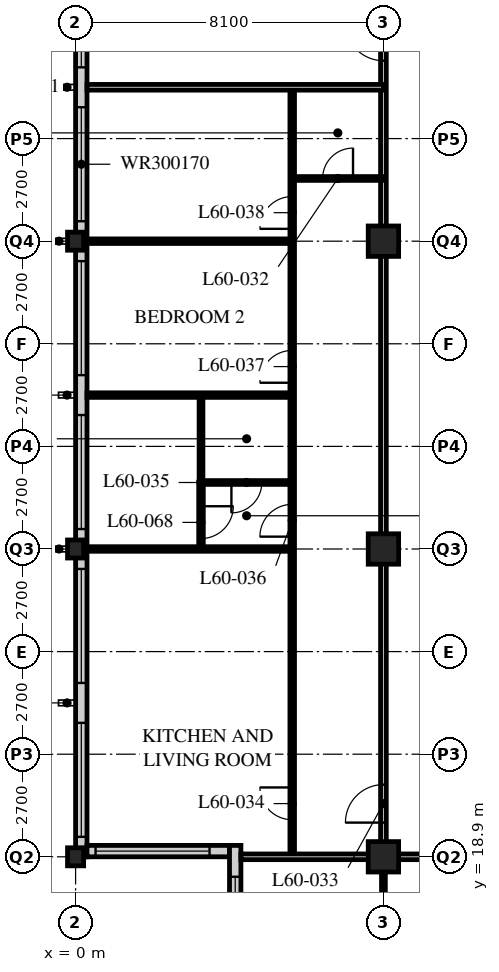
"""IFC4 building model, lengths in metres.
Left out: names, types, materials, properties, quantities, classifications, styles, units other than length and angle.
Written with IfcOpenShell. Run it as: python <this file> out.ifc"""

import sys

from ifc_helpers import new_model, si_unit, direction, frame, frame_2d, origin, origin_2d, place, context, subcontext, project, spatial, rectangle, hollow_rectangle, i_section, extrude, element, fill, save


model = new_model("IFC4")
c1 = context("Model", 3, precision=1e-05, world=origin(), true_north=direction((0.0, 1.0)))
c2 = subcontext(c1, "Body", "Model", "MODEL_VIEW")
j1 = project(units=[si_unit("LENGTHUNIT", "METRE"), si_unit("PLANEANGLEUNIT", "RADIAN")], contexts=[c1])
p1 = place(None, origin())
s1 = spatial("IfcSite", under=j1, at=p1, CompositionType="ELEMENT")
p2 = place(p1, origin())
s2 = spatial("IfcBuilding", under=s1, at=p2, CompositionType="ELEMENT")
p3 = place(p2, frame((0.0, 0.0, 231.6)))
s3 = spatial("IfcBuildingStorey", under=s2, at=p3, CompositionType="ELEMENT", Elevation=231.6)
for number, where, z_axis, x_axis in (
    (1, (0.0, 18.9, 0.0), (0.0, 0.0, 1.0), (1.0, 0.0, 0.0)),
    (2, (0.0, 27.0, 0.0), (0.0, 0.0, 1.0), (1.0, 0.0, 0.0)),
    (3, (0.0, 35.1, 0.0), (0.0, 0.0, 1.0), (1.0, 0.0, 0.0)),
):
    element("IfcColumn", number, at=place(p3, frame(where, z_axis=z_axis, x_axis=x_axis)), inside=s3, PredefinedType="COLUMN", context=c2, shape_type="SweptSolid", body=[
        extrude(i_section(OverallWidth=0.424, OverallDepth=0.475, WebThickness=0.048, FlangeThickness=0.077, FilletRadius=0.015, at=origin_2d()), origin(), (0.0, 0.0, 1.0), 3.6),
    ])
for number, where, z_axis, x_axis in (
    (4, (8.1, 18.9, 0.0), (0.0, 0.0, 1.0), (1.0, 0.0, 0.0)),
    (5, (8.1, 27.0, 0.0), (0.0, 0.0, 1.0), (1.0, 0.0, 0.0)),
    (6, (8.1, 35.1, 0.0), (0.0, 0.0, 1.0), (1.0, 0.0, 0.0)),
):
    element("IfcColumn", number, at=place(p3, frame(where, z_axis=z_axis, x_axis=x_axis)), inside=s3, PredefinedType="COLUMN", context=c2, shape_type="SweptSolid", body=[
        extrude(hollow_rectangle(XDim=0.8, YDim=0.8, WallThickness=0.08, at=origin_2d()), origin(), (0.0, 0.0, 1.0), 3.6),
    ])
p4 = place(p3, frame((0.15, 51.0, 0.0), z_axis=(0.0, 0.0, 1.0), x_axis=(0.0, -1.0, 0.0)))
e7 = element("IfcWall", 7, at=p4, inside=s3, PredefinedType="SOLIDWALL", context=c2, shape_type="SweptSolid", body=[
    extrude(rectangle(XDim=32.1, YDim=0.3, at=frame_2d((16.05, 0.0))), origin(), (0.0, 0.0, 1.0), 2.35),
])
p5 = place(p4, frame((0.225, 0.0, 0.6)))
e8 = element("IfcOpeningElement", 8, at=p5, cuts=e7, PredefinedType="OPENING", context=c2, shape_type="SweptSolid", body=[
    extrude(rectangle(XDim=3.0, YDim=1.7, at=frame_2d((1.5, 0.85))), frame((0.0, 0.16, 0.0), z_axis=(0.0, -1.0, 0.0), x_axis=(1.0, 0.0, 0.0)), (0.0, 0.0, 1.0), 0.32),
])
p6 = place(p4, frame((4.275, 0.0, 0.6)))
e9 = element("IfcOpeningElement", 9, at=p6, cuts=e7, PredefinedType="OPENING", context=c2, shape_type="SweptSolid", body=[
    extrude(rectangle(XDim=3.0, YDim=1.7, at=frame_2d((1.5, 0.85))), frame((0.0, 0.16, 0.0), z_axis=(0.0, -1.0, 0.0), x_axis=(1.0, 0.0, 0.0)), (0.0, 0.0, 1.0), 0.32),
])
p7 = place(p4, frame((8.325, 0.0, 0.6)))
e10 = element("IfcOpeningElement", 10, at=p7, cuts=e7, PredefinedType="OPENING", context=c2, shape_type="SweptSolid", body=[
    extrude(rectangle(XDim=3.0, YDim=1.7, at=frame_2d((1.5, 0.85))), frame((0.0, 0.16, 0.0), z_axis=(0.0, -1.0, 0.0), x_axis=(1.0, 0.0, 0.0)), (0.0, 0.0, 1.0), 0.32),
])
p8 = place(p4, frame((12.375, 0.0, 0.6)))
e11 = element("IfcOpeningElement", 11, at=p8, cuts=e7, PredefinedType="OPENING", context=c2, shape_type="SweptSolid", body=[
    extrude(rectangle(XDim=3.0, YDim=1.7, at=frame_2d((1.5, 0.85))), frame((0.0, 0.16, 0.0), z_axis=(0.0, -1.0, 0.0), x_axis=(1.0, 0.0, 0.0)), (0.0, 0.0, 1.0), 0.32),
])
p9 = place(p4, frame((16.425, 0.0, 0.6)))
e12 = element("IfcOpeningElement", 12, at=p9, cuts=e7, PredefinedType="OPENING", context=c2, shape_type="SweptSolid", body=[
    extrude(rectangle(XDim=3.0, YDim=1.7, at=frame_2d((1.5, 0.85))), frame((0.0, 0.16, 0.0), z_axis=(0.0, -1.0, 0.0), x_axis=(1.0, 0.0, 0.0)), (0.0, 0.0, 1.0), 0.32),
])
p10 = place(p4, frame((20.475, 0.0, 0.6)))
e13 = element("IfcOpeningElement", 13, at=p10, cuts=e7, PredefinedType="OPENING", context=c2, shape_type="SweptSolid", body=[
    extrude(rectangle(XDim=3.0, YDim=1.7, at=frame_2d((1.5, 0.85))), frame((0.0, 0.16, 0.0), z_axis=(0.0, -1.0, 0.0), x_axis=(1.0, 0.0, 0.0)), (0.0, 0.0, 1.0), 0.32),
])
p11 = place(p4, frame((24.525, 0.0, 0.6)))
e14 = element("IfcOpeningElement", 14, at=p11, cuts=e7, PredefinedType="OPENING", context=c2, shape_type="SweptSolid", body=[
    extrude(rectangle(XDim=3.0, YDim=1.7, at=frame_2d((1.5, 0.85))), frame((0.0, 0.16, 0.0), z_axis=(0.0, -1.0, 0.0), x_axis=(1.0, 0.0, 0.0)), (0.0, 0.0, 1.0), 0.32),
])
p12 = place(p4, frame((28.575, 0.0, 0.6)))
e15 = element("IfcOpeningElement", 15, at=p12, cuts=e7, PredefinedType="OPENING", context=c2, shape_type="SweptSolid", body=[
    extrude(rectangle(XDim=3.0, YDim=1.7, at=frame_2d((1.5, 0.85))), frame((0.0, 0.16, 0.0), z_axis=(0.0, -1.0, 0.0), x_axis=(1.0, 0.0, 0.0)), (0.0, 0.0, 1.0), 0.32),
])
p13 = place(p3, frame((0.3, 19.05, 0.0), z_axis=(0.0, 0.0, 1.0), x_axis=(1.0, 0.0, 0.0)))
e16 = element("IfcWall", 16, at=p13, inside=s3, PredefinedType="SOLIDWALL", context=c2, shape_type="SweptSolid", body=[
    extrude(rectangle(XDim=3.75, YDim=0.3, at=frame_2d((1.875, 0.0))), origin(), (0.0, 0.0, 1.0), 2.35),
])
p14 = place(p13, frame((0.225, 0.0, 0.6)))
e17 = element("IfcOpeningElement", 17, at=p14, cuts=e16, PredefinedType="OPENING", context=c2, shape_type="SweptSolid", body=[
    extrude(rectangle(XDim=3.0, YDim=1.7, at=frame_2d((1.5, 0.85))), frame((0.0, 0.16, 0.0), z_axis=(0.0, -1.0, 0.0), x_axis=(1.0, 0.0, 0.0)), (0.0, 0.0, 1.0), 0.32),
])
p15 = place(p3, frame((4.2, 19.2, 0.0), z_axis=(0.0, 0.0, 1.0), x_axis=(0.0, -1.0, 0.0)))
e18 = element("IfcWall", 18, at=p15, inside=s3, PredefinedType="SOLIDWALL", context=c2, shape_type="SweptSolid", body=[
    extrude(rectangle(XDim=4.35, YDim=0.3, at=frame_2d((2.175, 0.0))), origin(), (0.0, 0.0, 1.0), 2.65),
])
p16 = place(p15, frame((0.825, 0.0, 0.6)))
e19 = element("IfcOpeningElement", 19, at=p16, cuts=e18, PredefinedType="OPENING", context=c2, shape_type="SweptSolid", body=[
    extrude(rectangle(XDim=3.0, YDim=1.7, at=frame_2d((1.5, 0.85))), frame((0.0, 0.16, 0.0), z_axis=(0.0, -1.0, 0.0), x_axis=(1.0, 0.0, 0.0)), (0.0, 0.0, 1.0), 0.32),
])
p17 = place(p3, frame((8.1, 18.9, 0.0), z_axis=(0.0, 0.0, 1.0), x_axis=(1.0, 0.0, 0.0)))
e20 = element("IfcWall", 20, at=p17, inside=s3, PredefinedType="PARTITIONING", context=c2, shape_type="SweptSolid", body=[
    extrude(rectangle(XDim=36.45, YDim=0.15, at=frame_2d((18.225, 0.0))), origin(), (0.0, 0.0, 1.0), 2.35),
])
p18 = place(p17, frame((4.45, 0.0, 0.0)))
e21 = element("IfcOpeningElement", 21, at=p18, cuts=e20, PredefinedType="OPENING", context=c2, shape_type="SweptSolid", body=[
    extrude(rectangle(XDim=1.0, YDim=2.1, at=frame_2d((0.5, 1.05))), frame((0.0, 0.085, 0.0), z_axis=(0.0, -1.0, 0.0), x_axis=(1.0, 0.0, 0.0)), (0.0, 0.0, 1.0), 0.17),
])
p19 = place(p17, frame((17.1, 0.0, 0.0)))
e22 = element("IfcOpeningElement", 22, at=p19, cuts=e20, PredefinedType="OPENING", context=c2, shape_type="SweptSolid", body=[
    extrude(rectangle(XDim=1.0, YDim=2.1, at=frame_2d((0.5, 1.05))), frame((0.0, 0.085, 0.0), z_axis=(0.0, -1.0, 0.0), x_axis=(1.0, 0.0, 0.0)), (0.0, 0.0, 1.0), 0.17),
])
p20 = place(p17, frame((29.05, 0.0, 0.0)))
e23 = element("IfcOpeningElement", 23, at=p20, cuts=e20, PredefinedType="OPENING", context=c2, shape_type="SweptSolid", body=[
    extrude(rectangle(XDim=1.0, YDim=2.1, at=frame_2d((0.5, 1.05))), frame((0.0, 0.085, 0.0), z_axis=(0.0, -1.0, 0.0), x_axis=(1.0, 0.0, 0.0)), (0.0, 0.0, 1.0), 0.17),
])
p21 = place(p17, frame((2.625, 0.0, 0.0)))
e24 = element("IfcOpeningElement", 24, at=p21, cuts=e20, PredefinedType="OPENING", context=c2, shape_type="SweptSolid", body=[
    extrude(rectangle(XDim=1.0, YDim=2.1, at=frame_2d((0.5, 1.05))), frame((0.0, 0.085, 0.0), z_axis=(0.0, -1.0, 0.0), x_axis=(1.0, 0.0, 0.0)), (0.0, 0.0, 1.0), 0.17),
])
p22 = place(p17, frame((33.925, 0.0, 0.0)))
e25 = element("IfcOpeningElement", 25, at=p22, cuts=e20, PredefinedType="OPENING", context=c2, shape_type="SweptSolid", body=[
    extrude(rectangle(XDim=1.0, YDim=2.1, at=frame_2d((0.5, 1.05))), frame((0.0, 0.085, 0.0), z_axis=(0.0, -1.0, 0.0), x_axis=(1.0, 0.0, 0.0)), (0.0, 0.0, 1.0), 0.17),
])
p23 = place(p3, frame((8.1, 18.9, 0.0), z_axis=(0.0, 0.0, 1.0), x_axis=(0.0, 1.0, 0.0)))
e26 = element("IfcWall", 26, at=p23, inside=s3, PredefinedType="PARTITIONING", context=c2, shape_type="SweptSolid", body=[
    extrude(rectangle(XDim=24.3, YDim=0.15, at=frame_2d((12.15, 0.0))), origin(), (0.0, 0.0, 1.0), 2.35),
])
p24 = place(p23, frame((0.9, 0.0, 0.0)))
e27 = element("IfcOpeningElement", 27, at=p24, cuts=e26, PredefinedType="OPENING", context=c2, shape_type="SweptSolid", body=[
    extrude(rectangle(XDim=1.0, YDim=2.1, at=frame_2d((0.5, 1.05))), frame((0.0, 0.085, 0.0), z_axis=(0.0, -1.0, 0.0), x_axis=(1.0, 0.0, 0.0)), (0.0, 0.0, 1.0), 0.17),
])
p25 = place(p23, frame((20.95, 0.0, 0.0)))
e28 = element("IfcOpeningElement", 28, at=p25, cuts=e26, PredefinedType="OPENING", context=c2, shape_type="SweptSolid", body=[
    extrude(rectangle(XDim=1.0, YDim=2.1, at=frame_2d((0.5, 1.05))), frame((0.0, 0.085, 0.0), z_axis=(0.0, -1.0, 0.0), x_axis=(1.0, 0.0, 0.0)), (0.0, 0.0, 1.0), 0.17),
])
p26 = place(p3, frame((5.7, 18.9, 0.0), z_axis=(0.0, 0.0, 1.0), x_axis=(0.0, 1.0, 0.0)))
e29 = element("IfcWall", 29, at=p26, inside=s3, PredefinedType="PARTITIONING", context=c2, shape_type="SweptSolid", body=[
    extrude(rectangle(XDim=20.25, YDim=0.12, at=frame_2d((10.125, 0.0))), origin(), (0.0, 0.0, 1.0), 3.35),
])
p27 = place(p26, frame((0.975, 0.0, 0.0)))
e30 = element("IfcOpeningElement", 30, at=p27, cuts=e29, PredefinedType="OPENING", context=c2, shape_type="SweptSolid", body=[
    extrude(rectangle(XDim=0.85, YDim=2.1, at=frame_2d((0.425, 1.05))), frame((0.0, 0.07, 0.0), z_axis=(0.0, -1.0, 0.0), x_axis=(1.0, 0.0, 0.0)), (0.0, 0.0, 1.0), 0.14),
])
p28 = place(p26, frame((8.425, 0.0, 0.0)))
e31 = element("IfcOpeningElement", 31, at=p28, cuts=e29, PredefinedType="OPENING", context=c2, shape_type="SweptSolid", body=[
    extrude(rectangle(XDim=0.85, YDim=2.1, at=frame_2d((0.425, 1.05))), frame((0.0, 0.07, 0.0), z_axis=(0.0, -1.0, 0.0), x_axis=(1.0, 0.0, 0.0)), (0.0, 0.0, 1.0), 0.14),
])
p29 = place(p26, frame((12.475, 0.0, 0.0)))
e32 = element("IfcOpeningElement", 32, at=p29, cuts=e29, PredefinedType="OPENING", context=c2, shape_type="SweptSolid", body=[
    extrude(rectangle(XDim=0.85, YDim=2.1, at=frame_2d((0.425, 1.05))), frame((0.0, 0.07, 0.0), z_axis=(0.0, -1.0, 0.0), x_axis=(1.0, 0.0, 0.0)), (0.0, 0.0, 1.0), 0.14),
])
p30 = place(p26, frame((16.525, 0.0, 0.0)))
e33 = element("IfcOpeningElement", 33, at=p30, cuts=e29, PredefinedType="OPENING", context=c2, shape_type="SweptSolid", body=[
    extrude(rectangle(XDim=0.85, YDim=2.1, at=frame_2d((0.425, 1.05))), frame((0.0, 0.07, 0.0), z_axis=(0.0, -1.0, 0.0), x_axis=(1.0, 0.0, 0.0)), (0.0, 0.0, 1.0), 0.14),
])
p31 = place(p3, frame((8.1, 36.75, 0.0), z_axis=(0.0, 0.0, 1.0), x_axis=(-1.0, 0.0, 0.0)))
e34 = element("IfcWall", 34, at=p31, inside=s3, PredefinedType="PARTITIONING", context=c2, shape_type="SweptSolid", body=[
    extrude(rectangle(XDim=2.4, YDim=0.1, at=frame_2d((1.2, 0.0))), origin(), (0.0, 0.0, 1.0), 3.35),
])
p32 = place(p31, frame((0.8, 0.0, 0.0)))
e35 = element("IfcOpeningElement", 35, at=p32, cuts=e34, PredefinedType="OPENING", context=c2, shape_type="SweptSolid", body=[
    extrude(rectangle(XDim=0.8, YDim=2.1, at=frame_2d((0.4, 1.05))), frame((0.0, 0.06, 0.0), z_axis=(0.0, -1.0, 0.0), x_axis=(1.0, 0.0, 0.0)), (0.0, 0.0, 1.0), 0.12),
])
p33 = place(p3, frame((5.7, 28.75, 0.0), z_axis=(0.0, 0.0, 1.0), x_axis=(-1.0, 0.0, 0.0)))
e36 = element("IfcWall", 36, at=p33, inside=s3, PredefinedType="PARTITIONING", context=c2, shape_type="SweptSolid", body=[
    extrude(rectangle(XDim=2.4, YDim=0.1, at=frame_2d((1.2, 0.0))), origin(), (0.0, 0.0, 1.0), 3.35),
])
p34 = place(p33, frame((0.8, 0.0, 0.0)))
e37 = element("IfcOpeningElement", 37, at=p34, cuts=e36, PredefinedType="OPENING", context=c2, shape_type="SweptSolid", body=[
    extrude(rectangle(XDim=0.8, YDim=2.1, at=frame_2d((0.4, 1.05))), frame((0.0, 0.06, 0.0), z_axis=(0.0, -1.0, 0.0), x_axis=(1.0, 0.0, 0.0)), (0.0, 0.0, 1.0), 0.12),
])
p35 = place(p3, frame((3.3, 28.75, 0.0), z_axis=(0.0, 0.0, 1.0), x_axis=(0.0, 1.0, 0.0)))
e38 = element("IfcWall", 38, at=p35, inside=s3, PredefinedType="PARTITIONING", context=c2, shape_type="SweptSolid", body=[
    extrude(rectangle(XDim=2.3, YDim=0.1, at=frame_2d((1.15, 0.0))), origin(), (0.0, 0.0, 1.0), 3.35),
])
p36 = place(p3, frame((5.7, 27.0, 0.0), z_axis=(0.0, 0.0, 1.0), x_axis=(-1.0, 0.0, 0.0)))
e39 = element("IfcWall", 39, at=p36, inside=s3, PredefinedType="PARTITIONING", context=c2, shape_type="SweptSolid", body=[
    extrude(rectangle(XDim=5.4, YDim=0.12, at=frame_2d((2.7, 0.0))), origin(), (0.0, 0.0, 1.0), 2.588),
])
p37 = place(p3, frame((5.7, 31.05, 0.0), z_axis=(0.0, 0.0, 1.0), x_axis=(-1.0, 0.0, 0.0)))
e40 = element("IfcWall", 40, at=p37, inside=s3, PredefinedType="PARTITIONING", context=c2, shape_type="SweptSolid", body=[
    extrude(rectangle(XDim=5.4, YDim=0.12, at=frame_2d((2.7, 0.0))), origin(), (0.0, 0.0, 1.0), 3.35),
])
p38 = place(p3, frame((5.7, 35.1, 0.0), z_axis=(0.0, 0.0, 1.0), x_axis=(-1.0, 0.0, 0.0)))
e41 = element("IfcWall", 41, at=p38, inside=s3, PredefinedType="PARTITIONING", context=c2, shape_type="SweptSolid", body=[
    extrude(rectangle(XDim=5.4, YDim=0.12, at=frame_2d((2.7, 0.0))), origin(), (0.0, 0.0, 1.0), 2.588),
])
p39 = place(p3, frame((8.1, 39.15, 0.0), z_axis=(0.0, 0.0, 1.0), x_axis=(-1.0, 0.0, 0.0)))
e42 = element("IfcWall", 42, at=p39, inside=s3, PredefinedType="PARTITIONING", context=c2, shape_type="SweptSolid", body=[
    extrude(rectangle(XDim=7.8, YDim=0.15, at=frame_2d((3.9, 0.0))), origin(), (0.0, 0.0, 1.0), 3.35),
])
p40 = place(p3, frame((8.1, 18.9, 0.0), z_axis=(0.0, 0.0, 1.0), x_axis=(0.0, -1.0, 0.0)))
e43 = element("IfcWall", 43, at=p40, inside=s3, PredefinedType="PARTITIONING", context=c2, shape_type="SweptSolid", body=[
    extrude(rectangle(XDim=2.4, YDim=0.1, at=frame_2d((1.2, 0.0))), origin(), (0.0, 0.0, 1.0), 2.35),
])
p41 = place(p3, frame((4.35, 18.9, 0.0), z_axis=(0.0, 0.0, 1.0), x_axis=(1.0, 0.0, 0.0)))
e44 = element("IfcWall", 44, at=p41, inside=s3, PredefinedType="PARTITIONING", context=c2, shape_type="SweptSolid", body=[
    extrude(rectangle(XDim=3.75, YDim=0.15, at=frame_2d((1.875, 0.0))), origin(), (0.0, 0.0, 1.0), 2.35),
])
p42 = place(p3, frame((3.3, 27.0, 0.0), z_axis=(0.0, 0.0, 1.0), x_axis=(0.0, 1.0, 0.0)))
e45 = element("IfcWall", 45, at=p42, inside=s3, PredefinedType="PARTITIONING", context=c2, shape_type="SweptSolid", body=[
    extrude(rectangle(XDim=1.76, YDim=0.12, at=frame_2d((0.88, 0.0))), origin(), (0.0, 0.0, 1.0), 3.35),
])
p43 = place(p42, frame((0.275, 0.0, 0.0)))
e46 = element("IfcOpeningElement", 46, at=p43, cuts=e45, PredefinedType="OPENING", context=c2, shape_type="SweptSolid", body=[
    extrude(rectangle(XDim=0.85, YDim=2.1, at=frame_2d((0.425, 1.05))), frame((0.0, 0.07, 0.0), z_axis=(0.0, -1.0, 0.0), x_axis=(1.0, 0.0, 0.0)), (0.0, 0.0, 1.0), 0.14),
])
p44 = place(p7, origin())
e47 = element("IfcWindow", 47, at=p44, inside=s3, PartitioningType="SINGLE_PANEL", PredefinedType="WINDOW", context=c2, shape_type="SweptSolid", body=[
    extrude(rectangle(XDim=3.0, YDim=1.7, at=frame_2d((1.5, 0.85))), frame((0.0, 0.03, 0.0), z_axis=(0.0, -1.0, 0.0), x_axis=(1.0, 0.0, 0.0)), (0.0, 0.0, 1.0), 0.06),
])
fill(e10, e47)
p45 = place(p8, origin())
e48 = element("IfcWindow", 48, at=p45, inside=s3, PartitioningType="SINGLE_PANEL", PredefinedType="WINDOW", context=c2, shape_type="SweptSolid", body=[
    extrude(rectangle(XDim=3.0, YDim=1.7, at=frame_2d((1.5, 0.85))), frame((0.0, 0.03, 0.0), z_axis=(0.0, -1.0, 0.0), x_axis=(1.0, 0.0, 0.0)), (0.0, 0.0, 1.0), 0.06),
])
fill(e11, e48)
p46 = place(p9, origin())
e49 = element("IfcWindow", 49, at=p46, inside=s3, PartitioningType="SINGLE_PANEL", PredefinedType="WINDOW", context=c2, shape_type="SweptSolid", body=[
    extrude(rectangle(XDim=3.0, YDim=1.7, at=frame_2d((1.5, 0.85))), frame((0.0, 0.03, 0.0), z_axis=(0.0, -1.0, 0.0), x_axis=(1.0, 0.0, 0.0)), (0.0, 0.0, 1.0), 0.06),
])
fill(e12, e49)
p47 = place(p10, origin())
e50 = element("IfcWindow", 50, at=p47, inside=s3, PartitioningType="SINGLE_PANEL", PredefinedType="WINDOW", context=c2, shape_type="SweptSolid", body=[
    extrude(rectangle(XDim=3.0, YDim=1.7, at=frame_2d((1.5, 0.85))), frame((0.0, 0.03, 0.0), z_axis=(0.0, -1.0, 0.0), x_axis=(1.0, 0.0, 0.0)), (0.0, 0.0, 1.0), 0.06),
])
fill(e13, e50)
p48 = place(p11, origin())
e51 = element("IfcWindow", 51, at=p48, inside=s3, PartitioningType="SINGLE_PANEL", PredefinedType="WINDOW", context=c2, shape_type="SweptSolid", body=[
    extrude(rectangle(XDim=3.0, YDim=1.7, at=frame_2d((1.5, 0.85))), frame((0.0, 0.03, 0.0), z_axis=(0.0, -1.0, 0.0), x_axis=(1.0, 0.0, 0.0)), (0.0, 0.0, 1.0), 0.06),
])
fill(e14, e51)
p49 = place(p12, origin())
e52 = element("IfcWindow", 52, at=p49, inside=s3, PartitioningType="SINGLE_PANEL", PredefinedType="WINDOW", context=c2, shape_type="SweptSolid", body=[
    extrude(rectangle(XDim=3.0, YDim=1.7, at=frame_2d((1.5, 0.85))), frame((0.0, 0.03, 0.0), z_axis=(0.0, -1.0, 0.0), x_axis=(1.0, 0.0, 0.0)), (0.0, 0.0, 1.0), 0.06),
])
fill(e15, e52)
p50 = place(p14, origin())
e53 = element("IfcWindow", 53, at=p50, inside=s3, PartitioningType="SINGLE_PANEL", PredefinedType="WINDOW", context=c2, shape_type="SweptSolid", body=[
    extrude(rectangle(XDim=3.0, YDim=1.7, at=frame_2d((1.5, 0.85))), frame((0.0, 0.03, 0.0), z_axis=(0.0, -1.0, 0.0), x_axis=(1.0, 0.0, 0.0)), (0.0, 0.0, 1.0), 0.06),
])
fill(e17, e53)
p51 = place(p16, origin())
e54 = element("IfcWindow", 54, at=p51, inside=s3, PartitioningType="SINGLE_PANEL", PredefinedType="WINDOW", context=c2, shape_type="SweptSolid", body=[
    extrude(rectangle(XDim=3.0, YDim=1.7, at=frame_2d((1.5, 0.85))), frame((0.0, 0.03, 0.0), z_axis=(0.0, -1.0, 0.0), x_axis=(1.0, 0.0, 0.0)), (0.0, 0.0, 1.0), 0.06),
])
fill(e19, e54)
p52 = place(p32, origin())
e55 = element("IfcDoor", 55, at=p52, inside=s3, OperationType="SINGLE_SWING_RIGHT", PredefinedType="DOOR", context=c2, shape_type="SweptSolid", body=[
    extrude(rectangle(XDim=0.8, YDim=2.1, at=frame_2d((0.4, 1.05))), frame((0.0, 0.025, 0.0), z_axis=(0.0, -1.0, 0.0), x_axis=(1.0, 0.0, 0.0)), (0.0, 0.0, 1.0), 0.05),
])
fill(e35, e55)
p53 = place(p24, origin())
e56 = element("IfcDoor", 56, at=p53, inside=s3, OperationType="SINGLE_SWING_LEFT", PredefinedType="DOOR", context=c2, shape_type="SweptSolid", body=[
    extrude(rectangle(XDim=1.0, YDim=2.1, at=frame_2d((0.5, 1.05))), frame((0.0, 0.025, 0.0), z_axis=(0.0, -1.0, 0.0), x_axis=(1.0, 0.0, 0.0)), (0.0, 0.0, 1.0), 0.05),
])
fill(e27, e56)
p54 = place(p27, origin())
e57 = element("IfcDoor", 57, at=p54, inside=s3, OperationType="SINGLE_SWING_RIGHT", PredefinedType="DOOR", context=c2, shape_type="SweptSolid", body=[
    extrude(rectangle(XDim=0.85, YDim=2.1, at=frame_2d((0.425, 1.05))), frame((0.0, 0.025, 0.0), z_axis=(0.0, -1.0, 0.0), x_axis=(1.0, 0.0, 0.0)), (0.0, 0.0, 1.0), 0.05),
])
fill(e30, e57)
p55 = place(p34, origin())
e58 = element("IfcDoor", 58, at=p55, inside=s3, OperationType="SINGLE_SWING_RIGHT", PredefinedType="DOOR", context=c2, shape_type="SweptSolid", body=[
    extrude(rectangle(XDim=0.8, YDim=2.1, at=frame_2d((0.4, 1.05))), frame((0.0, 0.025, 0.0), z_axis=(0.0, -1.0, 0.0), x_axis=(1.0, 0.0, 0.0)), (0.0, 0.0, 1.0), 0.05),
])
fill(e37, e58)
p56 = place(p28, origin())
e59 = element("IfcDoor", 59, at=p56, inside=s3, OperationType="SINGLE_SWING_LEFT", PredefinedType="DOOR", context=c2, shape_type="SweptSolid", body=[
    extrude(rectangle(XDim=0.85, YDim=2.1, at=frame_2d((0.425, 1.05))), frame((0.0, 0.025, 0.0), z_axis=(0.0, -1.0, 0.0), x_axis=(1.0, 0.0, 0.0)), (0.0, 0.0, 1.0), 0.05),
])
fill(e31, e59)
p57 = place(p29, origin())
e60 = element("IfcDoor", 60, at=p57, inside=s3, OperationType="SINGLE_SWING_LEFT", PredefinedType="DOOR", context=c2, shape_type="SweptSolid", body=[
    extrude(rectangle(XDim=0.85, YDim=2.1, at=frame_2d((0.425, 1.05))), frame((0.0, 0.025, 0.0), z_axis=(0.0, -1.0, 0.0), x_axis=(1.0, 0.0, 0.0)), (0.0, 0.0, 1.0), 0.05),
])
fill(e32, e60)
p58 = place(p30, origin())
e61 = element("IfcDoor", 61, at=p58, inside=s3, OperationType="SINGLE_SWING_LEFT", PredefinedType="DOOR", context=c2, shape_type="SweptSolid", body=[
    extrude(rectangle(XDim=0.85, YDim=2.1, at=frame_2d((0.425, 1.05))), frame((0.0, 0.025, 0.0), z_axis=(0.0, -1.0, 0.0), x_axis=(1.0, 0.0, 0.0)), (0.0, 0.0, 1.0), 0.05),
])
fill(e33, e61)
p59 = place(p25, origin())
e62 = element("IfcDoor", 62, at=p59, inside=s3, OperationType="SINGLE_SWING_RIGHT", PredefinedType="DOOR", context=c2, shape_type="SweptSolid", body=[
    extrude(rectangle(XDim=1.0, YDim=2.1, at=frame_2d((0.5, 1.05))), frame((0.0, 0.025, 0.0), z_axis=(0.0, -1.0, 0.0), x_axis=(1.0, 0.0, 0.0)), (0.0, 0.0, 1.0), 0.05),
])
fill(e28, e62)
p60 = place(p43, origin())
e63 = element("IfcDoor", 63, at=p60, inside=s3, OperationType="SINGLE_SWING_LEFT", PredefinedType="DOOR", context=c2, shape_type="SweptSolid", body=[
    extrude(rectangle(XDim=0.85, YDim=2.1, at=frame_2d((0.425, 1.05))), frame((0.0, 0.025, 0.0), z_axis=(0.0, -1.0, 0.0), x_axis=(1.0, 0.0, 0.0)), (0.0, 0.0, 1.0), 0.05),
])
fill(e46, e63)
save(model, sys.argv[1])
